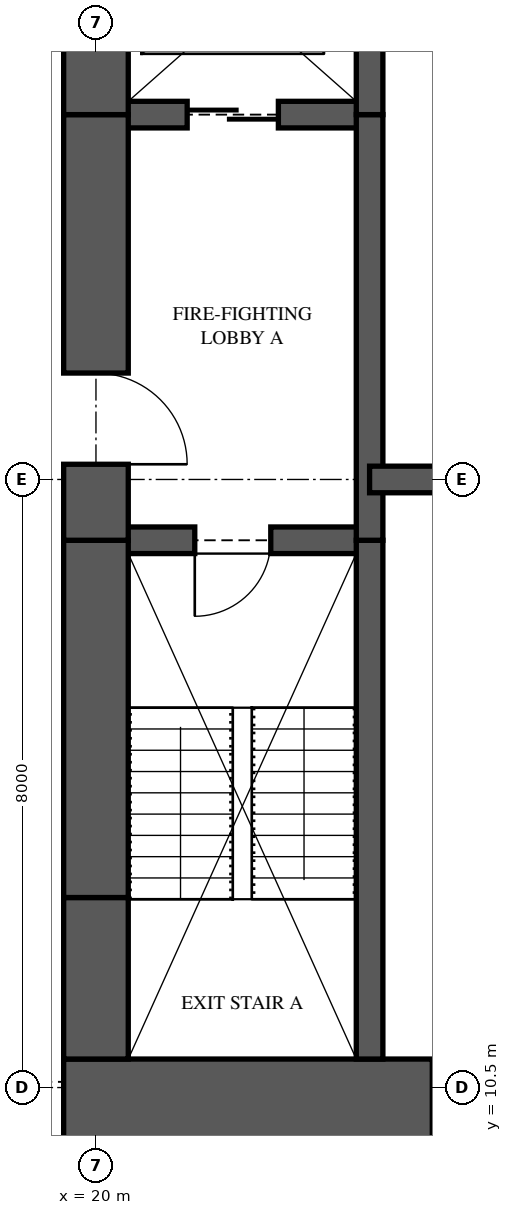
"""IFC4 building model, lengths in metres.
Left out: names, types, materials, properties, quantities, classifications, styles, units other than length and angle.
Written with IfcOpenShell. Run it as: python <this file> out.ifc"""

import sys

from ifc_helpers import new_model, si_unit, direction, frame, frame_2d, origin, place, context, subcontext, project, spatial, rectangle, extrude, element, fill, save


model = new_model("IFC4")
c1 = context("Model", 3, precision=1e-05, world=origin(), true_north=direction((0.0, 1.0)))
c2 = subcontext(c1, "Body", "Model", "MODEL_VIEW")
j1 = project(units=[si_unit("LENGTHUNIT", "METRE"), si_unit("PLANEANGLEUNIT", "RADIAN")], contexts=[c1])
p1 = place(None, origin())
s1 = spatial("IfcSite", under=j1, at=p1, CompositionType="ELEMENT")
p2 = place(p1, origin())
s2 = spatial("IfcBuilding", under=s1, at=p2, CompositionType="ELEMENT")
p3 = place(p2, frame((0.0, 0.0, 104.85)))
s3 = spatial("IfcBuildingStorey", under=s2, at=p3, CompositionType="ELEMENT", Elevation=104.85)
p4 = place(p3, frame((19.575, 10.125, 0.0), z_axis=(0.0, 0.0, 1.0), x_axis=(1.0, 0.0, 0.0)))
e1 = element("IfcWall", 1, at=p4, inside=s3, PredefinedType="SHEAR", context=c2, shape_type="SweptSolid", body=[
    extrude(rectangle(XDim=6.425, YDim=1.5, at=frame_2d((3.212, 0.0))), origin(), (0.0, 0.0, 1.0), 3.35),
])
p5 = place(p4, frame((4.85, 0.0, 0.0)))
e2 = element("IfcOpeningElement", 2, at=p5, cuts=e1, PredefinedType="OPENING", context=c2, shape_type="SweptSolid", body=[
    extrude(rectangle(XDim=0.75, YDim=2.1, at=frame_2d((0.375, 1.05))), frame((0.0, 0.76, 0.0), z_axis=(0.0, -1.0, 0.0), x_axis=(1.0, 0.0, 0.0)), (0.0, 0.0, 1.0), 1.52),
])
p6 = place(p3, frame((20.0, 26.125, 0.0), z_axis=(0.0, 0.0, 1.0), x_axis=(0.0, -1.0, 0.0)))
e3 = element("IfcWall", 3, at=p6, inside=s3, PredefinedType="SHEAR", context=c2, shape_type="SweptSolid", body=[
    extrude(rectangle(XDim=2.825, YDim=0.85, at=frame_2d((1.413, 0.0))), origin(), (0.0, 0.0, 1.0), 3.35),
])
p7 = place(p3, frame((20.0, 23.3, 0.0), z_axis=(0.0, 0.0, 1.0), x_axis=(0.0, -1.0, 0.0)))
e4 = element("IfcWall", 4, at=p7, inside=s3, PredefinedType="SHEAR", context=c2, shape_type="SweptSolid", body=[
    extrude(rectangle(XDim=5.6, YDim=0.85, at=frame_2d((2.8, 0.0))), origin(), (0.0, 0.0, 1.0), 3.35),
])
p8 = place(p7, frame((3.4, 0.0, 0.0)))
e5 = element("IfcOpeningElement", 5, at=p8, cuts=e4, PredefinedType="OPENING", context=c2, shape_type="SweptSolid", body=[
    extrude(rectangle(XDim=1.2, YDim=2.2, at=frame_2d((0.6, 1.1))), frame((0.0, 0.435, 0.0), z_axis=(0.0, -1.0, 0.0), x_axis=(1.0, 0.0, 0.0)), (0.0, 0.0, 1.0), 0.87),
])
p9 = place(p3, frame((20.0, 17.7, 0.0), z_axis=(0.0, 0.0, 1.0), x_axis=(0.0, -1.0, 0.0)))
e6 = element("IfcWall", 6, at=p9, inside=s3, PredefinedType="SHEAR", context=c2, shape_type="SweptSolid", body=[
    extrude(rectangle(XDim=4.7, YDim=0.85, at=frame_2d((2.35, 0.0))), origin(), (0.0, 0.0, 1.0), 3.35),
])
p10 = place(p3, frame((20.0, 13.0, 0.0), z_axis=(0.0, 0.0, 1.0), x_axis=(0.0, -1.0, 0.0)))
e7 = element("IfcWall", 7, at=p10, inside=s3, PredefinedType="SHEAR", context=c2, shape_type="SweptSolid", body=[
    extrude(rectangle(XDim=2.125, YDim=0.85, at=frame_2d((1.062, 0.0))), origin(), (0.0, 0.0, 1.0), 3.35),
])
p11 = place(p3, frame((23.6, 10.875, 0.0), z_axis=(0.0, 0.0, 1.0), x_axis=(0.0, 1.0, 0.0)))
e8 = element("IfcWall", 8, at=p11, inside=s3, PredefinedType="SHEAR", context=c2, shape_type="SweptSolid", body=[
    extrude(rectangle(XDim=6.825, YDim=0.35, at=frame_2d((3.413, 0.0))), origin(), (0.0, 0.0, 1.0), 3.35),
])
p12 = place(p3, frame((23.6, 17.7, 0.0), z_axis=(0.0, 0.0, 1.0), x_axis=(0.0, 1.0, 0.0)))
e9 = element("IfcWall", 9, at=p12, inside=s3, PredefinedType="SHEAR", context=c2, shape_type="SweptSolid", body=[
    extrude(rectangle(XDim=5.6, YDim=0.35, at=frame_2d((2.8, 0.0))), origin(), (0.0, 0.0, 1.0), 3.35),
])
p13 = place(p3, frame((23.6, 23.3, 0.0), z_axis=(0.0, 0.0, 1.0), x_axis=(0.0, 1.0, 0.0)))
e10 = element("IfcWall", 10, at=p13, inside=s3, PredefinedType="SHEAR", context=c2, shape_type="SweptSolid", body=[
    extrude(rectangle(XDim=2.825, YDim=0.35, at=frame_2d((1.413, 0.0))), origin(), (0.0, 0.0, 1.0), 3.35),
])
p14 = place(p3, frame((20.0, 17.7, 0.0), z_axis=(0.0, 0.0, 1.0), x_axis=(1.0, 0.0, 0.0)))
e11 = element("IfcWall", 11, at=p14, inside=s3, PredefinedType="SHEAR", context=c2, shape_type="SweptSolid", body=[
    extrude(rectangle(XDim=3.6, YDim=0.35, at=frame_2d((1.8, 0.0))), origin(), (0.0, 0.0, 1.0), 3.35),
])
p15 = place(p14, frame((1.3, 0.0, 0.0)))
e12 = element("IfcOpeningElement", 12, at=p15, cuts=e11, PredefinedType="OPENING", context=c2, shape_type="SweptSolid", body=[
    extrude(rectangle(XDim=1.0, YDim=2.1, at=frame_2d((0.5, 1.05))), frame((0.0, 0.185, 0.0), z_axis=(0.0, -1.0, 0.0), x_axis=(1.0, 0.0, 0.0)), (0.0, 0.0, 1.0), 0.37),
])
p16 = place(p3, frame((20.0, 23.3, 0.0), z_axis=(0.0, 0.0, 1.0), x_axis=(1.0, 0.0, 0.0)))
e13 = element("IfcWall", 13, at=p16, inside=s3, PredefinedType="SHEAR", context=c2, shape_type="SweptSolid", body=[
    extrude(rectangle(XDim=3.6, YDim=0.35, at=frame_2d((1.8, 0.0))), origin(), (0.0, 0.0, 1.0), 3.35),
])
p17 = place(p16, frame((1.2, 0.0, 0.0)))
e14 = element("IfcOpeningElement", 14, at=p17, cuts=e13, PredefinedType="OPENING", context=c2, shape_type="SweptSolid", body=[
    extrude(rectangle(XDim=1.2, YDim=2.1, at=frame_2d((0.6, 1.05))), frame((0.0, 0.185, 0.0), z_axis=(0.0, -1.0, 0.0), x_axis=(1.0, 0.0, 0.0)), (0.0, 0.0, 1.0), 0.37),
])
p18 = place(p3, frame((23.6, 18.5, 0.0), z_axis=(0.0, 0.0, 1.0), x_axis=(1.0, 0.0, 0.0)))
e15 = element("IfcWall", 15, at=p18, inside=s3, PredefinedType="SHEAR", context=c2, shape_type="SweptSolid", body=[
    extrude(rectangle(XDim=2.4, YDim=0.35, at=frame_2d((1.2, 0.0))), origin(), (0.0, 0.0, 1.0), 3.35),
])
p19 = place(p15, frame((1.0, 0.0, 0.0), z_axis=(0.0, 0.0, 1.0), x_axis=(-1.0, 0.0, 0.0)))
e16 = element("IfcDoor", 16, at=p19, inside=s3, OperationType="SINGLE_SWING_RIGHT", PredefinedType="DOOR", context=c2, shape_type="SweptSolid", body=[
    extrude(rectangle(XDim=1.0, YDim=2.1, at=frame_2d((0.5, 1.05))), frame((0.0, 0.025, 0.0), z_axis=(0.0, -1.0, 0.0), x_axis=(1.0, 0.0, 0.0)), (0.0, 0.0, 1.0), 0.05),
])
fill(e12, e16)
p20 = place(p8, origin())
e17 = element("IfcDoor", 17, at=p20, inside=s3, OperationType="SINGLE_SWING_RIGHT", PredefinedType="DOOR", context=c2, shape_type="SweptSolid", body=[
    extrude(rectangle(XDim=1.2, YDim=2.2, at=frame_2d((0.6, 1.1))), frame((0.0, 0.025, 0.0), z_axis=(0.0, -1.0, 0.0), x_axis=(1.0, 0.0, 0.0)), (0.0, 0.0, 1.0), 0.05),
])
fill(e5, e17)
p21 = place(p17, origin())
e18 = element("IfcDoor", 18, at=p21, inside=s3, OperationType="SLIDING_TO_LEFT", PredefinedType="DOOR", context=c2, shape_type="SweptSolid", body=[
    extrude(rectangle(XDim=1.2, YDim=2.1, at=frame_2d((0.6, 1.05))), frame((0.0, 0.025, 0.0), z_axis=(0.0, -1.0, 0.0), x_axis=(1.0, 0.0, 0.0)), (0.0, 0.0, 1.0), 0.05),
])
fill(e14, e18)
save(model, sys.argv[1])
